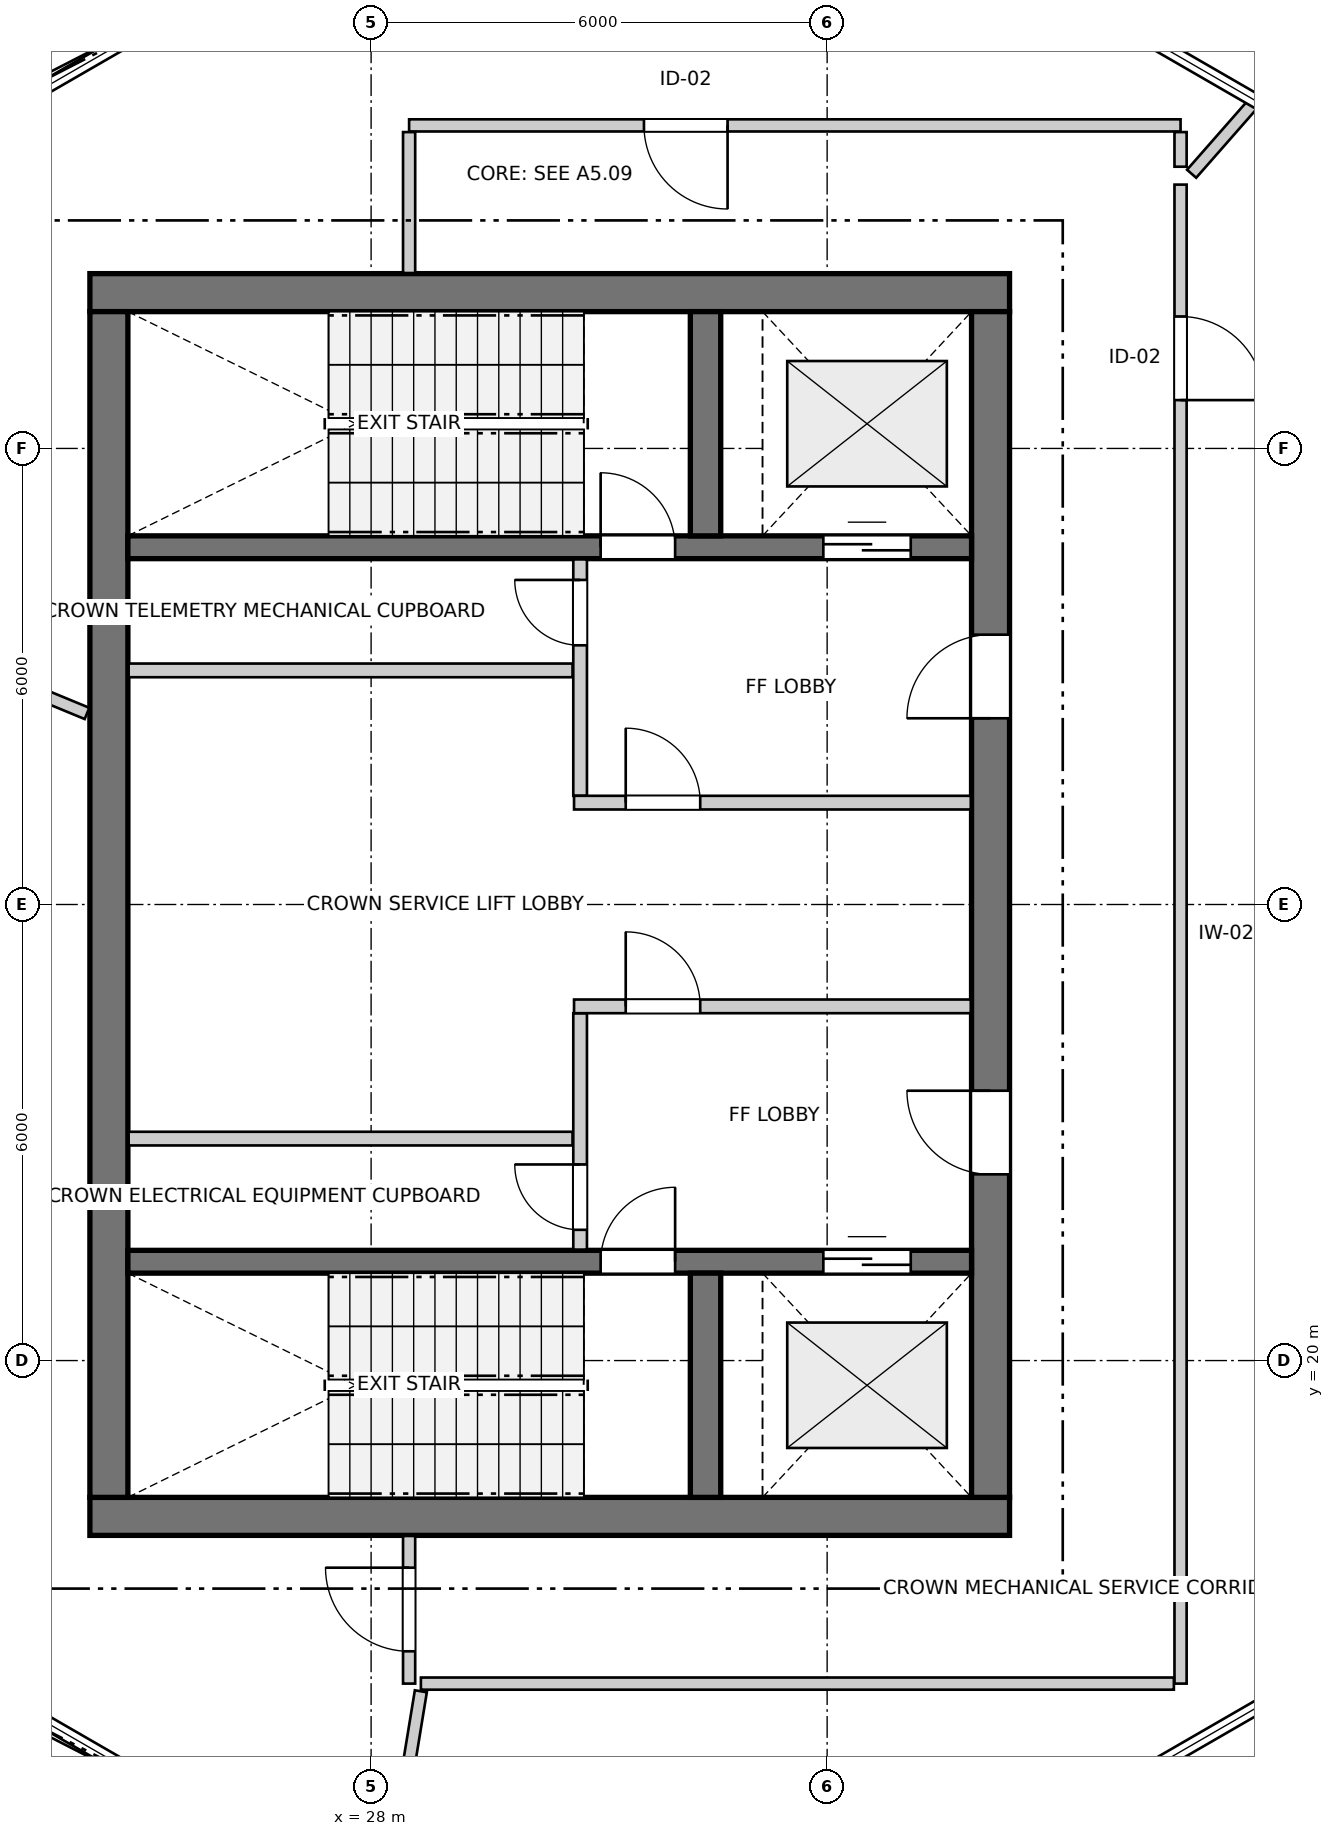
"""IFC4 building model, lengths in metres.
Left out: names, types, materials, properties, quantities, classifications, styles, units other than length and angle.
Written with IfcOpenShell. Run it as: python <this file> out.ifc"""

import sys

from ifc_helpers import new_model, si_unit, direction, frame, frame_2d, origin, place, context, subcontext, project, spatial, rectangle, extrude, source, transform, mapped, element, fill, save


model = new_model("IFC4")
c1 = context("Model", 3, precision=1e-05, world=origin(), true_north=direction((0.0, 1.0)))
c2 = subcontext(c1, "Body", "Model", "MODEL_VIEW")
j1 = project(units=[si_unit("LENGTHUNIT", "METRE"), si_unit("PLANEANGLEUNIT", "RADIAN")], contexts=[c1])
p1 = place(None, origin())
s1 = spatial("IfcSite", under=j1, at=p1, CompositionType="ELEMENT")
p2 = place(p1, origin())
s2 = spatial("IfcBuilding", under=s1, at=p2, CompositionType="ELEMENT")
p3 = place(p2, frame((0.0, 0.0, 261.8)))
s3 = spatial("IfcBuildingStorey", under=s2, at=p3, CompositionType="ELEMENT", Elevation=261.8)
for number, where, z_axis, x_axis in (
    (1, (24.3, 17.95, 0.0), (0.0, 0.0, 1.0), (1.0, 0.0, 0.0)),
    (2, (36.4, 34.05, 0.0), (0.0, 0.0, 1.0), (-1.0, 0.0, 0.0)),
):
    element("IfcWall", number, at=place(p3, frame(where, z_axis=z_axis, x_axis=x_axis)), inside=s3, PredefinedType="SHEAR", context=c2, shape_type="SweptSolid", body=[
        extrude(rectangle(XDim=12.1, YDim=0.5, at=frame_2d((6.05, 0.0))), origin(), (0.0, 0.0, 1.0), 4.05),
    ])
p4 = place(p3, frame((24.55, 33.8, 0.0), z_axis=(0.0, 0.0, 1.0), x_axis=(0.0, -1.0, 0.0)))
e3 = element("IfcWall", 3, at=p4, inside=s3, PredefinedType="SHEAR", context=c2, shape_type="SweptSolid", body=[
    extrude(rectangle(XDim=15.6, YDim=0.5, at=frame_2d((7.8, 0.0))), origin(), (0.0, 0.0, 1.0), 4.05),
])
p5 = place(p3, frame((36.15, 18.2, 0.0), z_axis=(0.0, 0.0, 1.0), x_axis=(0.0, 1.0, 0.0)))
e4 = element("IfcWall", 4, at=p5, inside=s3, PredefinedType="SHEAR", context=c2, shape_type="SweptSolid", body=[
    extrude(rectangle(XDim=15.6, YDim=0.5, at=frame_2d((7.8, 0.0))), origin(), (0.0, 0.0, 1.0), 4.05),
])
p6 = place(p5, frame((4.25, 0.0, 0.0)))
e5 = element("IfcOpeningElement", 5, at=p6, cuts=e4, PredefinedType="OPENING", context=c2, shape_type="SweptSolid", body=[
    extrude(rectangle(XDim=1.1, YDim=2.15, at=frame_2d((0.55, 1.075))), frame((0.0, 0.26, 0.0), z_axis=(0.0, -1.0, 0.0), x_axis=(1.0, 0.0, 0.0)), (0.0, 0.0, 1.0), 0.52),
])
p7 = place(p5, frame((10.25, 0.0, 0.0)))
e6 = element("IfcOpeningElement", 6, at=p7, cuts=e4, PredefinedType="OPENING", context=c2, shape_type="SweptSolid", body=[
    extrude(rectangle(XDim=1.1, YDim=2.15, at=frame_2d((0.55, 1.075))), frame((0.0, 0.26, 0.0), z_axis=(0.0, -1.0, 0.0), x_axis=(1.0, 0.0, 0.0)), (0.0, 0.0, 1.0), 0.52),
])
p8 = place(p3, frame((24.8, 21.3, 0.0), z_axis=(0.0, 0.0, 1.0), x_axis=(1.0, 0.0, 0.0)))
e7 = element("IfcWall", 7, at=p8, inside=s3, PredefinedType="SHEAR", context=c2, shape_type="SweptSolid", body=[
    extrude(rectangle(XDim=11.1, YDim=0.3, at=frame_2d((5.55, 0.0))), origin(), (0.0, 0.0, 1.0), 4.05),
])
p9 = place(p8, frame((6.22, 0.0, 0.0)))
e8 = element("IfcOpeningElement", 8, at=p9, cuts=e7, PredefinedType="OPENING", context=c2, shape_type="SweptSolid", body=[
    extrude(rectangle(XDim=0.98, YDim=2.15, at=frame_2d((0.49, 1.075))), frame((0.0, 0.16, 0.0), z_axis=(0.0, -1.0, 0.0), x_axis=(1.0, 0.0, 0.0)), (0.0, 0.0, 1.0), 0.32),
])
p10 = place(p8, frame((9.15, 0.0, 0.0)))
e9 = element("IfcOpeningElement", 9, at=p10, cuts=e7, PredefinedType="OPENING", context=c2, shape_type="SweptSolid", body=[
    extrude(rectangle(XDim=1.15, YDim=2.15, at=frame_2d((0.575, 1.075))), frame((0.0, 0.16, 0.0), z_axis=(0.0, -1.0, 0.0), x_axis=(1.0, 0.0, 0.0)), (0.0, 0.0, 1.0), 0.32),
])
p11 = place(p3, frame((32.4, 18.2, 0.0), z_axis=(0.0, 0.0, 1.0), x_axis=(0.0, 1.0, 0.0)))
e10 = element("IfcWall", 10, at=p11, inside=s3, PredefinedType="SHEAR", context=c2, shape_type="SweptSolid", body=[
    extrude(rectangle(XDim=2.95, YDim=0.4, at=frame_2d((1.475, 0.0))), origin(), (0.0, 0.0, 1.0), 4.05),
])
p12 = place(p3, frame((24.8, 30.7, 0.0), z_axis=(0.0, 0.0, 1.0), x_axis=(1.0, 0.0, 0.0)))
e11 = element("IfcWall", 11, at=p12, inside=s3, PredefinedType="SHEAR", context=c2, shape_type="SweptSolid", body=[
    extrude(rectangle(XDim=11.1, YDim=0.3, at=frame_2d((5.55, 0.0))), origin(), (0.0, 0.0, 1.0), 4.05),
])
p13 = place(p12, frame((6.22, 0.0, 0.0)))
e12 = element("IfcOpeningElement", 12, at=p13, cuts=e11, PredefinedType="OPENING", context=c2, shape_type="SweptSolid", body=[
    extrude(rectangle(XDim=0.98, YDim=2.15, at=frame_2d((0.49, 1.075))), frame((0.0, 0.16, 0.0), z_axis=(0.0, -1.0, 0.0), x_axis=(1.0, 0.0, 0.0)), (0.0, 0.0, 1.0), 0.32),
])
p14 = place(p12, frame((9.15, 0.0, 0.0)))
e13 = element("IfcOpeningElement", 13, at=p14, cuts=e11, PredefinedType="OPENING", context=c2, shape_type="SweptSolid", body=[
    extrude(rectangle(XDim=1.15, YDim=2.15, at=frame_2d((0.575, 1.075))), frame((0.0, 0.16, 0.0), z_axis=(0.0, -1.0, 0.0), x_axis=(1.0, 0.0, 0.0)), (0.0, 0.0, 1.0), 0.32),
])
p15 = place(p3, frame((32.4, 30.85, 0.0), z_axis=(0.0, 0.0, 1.0), x_axis=(0.0, 1.0, 0.0)))
e14 = element("IfcWall", 14, at=p15, inside=s3, PredefinedType="SHEAR", context=c2, shape_type="SweptSolid", body=[
    extrude(rectangle(XDim=2.95, YDim=0.4, at=frame_2d((1.475, 0.0))), origin(), (0.0, 0.0, 1.0), 4.05),
])
p16 = place(p3, frame((30.75, 21.46, 0.0), z_axis=(0.0, 0.0, 1.0), x_axis=(0.0, 1.0, 0.0)))
e15 = element("IfcWall", 15, at=p16, inside=s3, PredefinedType="PARTITIONING", context=c2, shape_type="SweptSolid", body=[
    extrude(rectangle(XDim=3.11, YDim=0.18, at=frame_2d((1.555, 0.0))), origin(), (0.0, 0.0, 1.0), 4.05),
])
p17 = place(p16, frame((0.26, 0.0, 0.0)))
e16 = element("IfcOpeningElement", 16, at=p17, cuts=e15, PredefinedType="OPENING", context=c2, shape_type="SweptSolid", body=[
    extrude(rectangle(XDim=0.86, YDim=2.05, at=frame_2d((0.43, 1.025))), frame((0.0, 0.1, 0.0), z_axis=(0.0, -1.0, 0.0), x_axis=(1.0, 0.0, 0.0)), (0.0, 0.0, 1.0), 0.2),
])
p18 = place(p3, frame((30.67, 24.66, 0.0), z_axis=(0.0, 0.0, 1.0), x_axis=(1.0, 0.0, 0.0)))
e17 = element("IfcWall", 17, at=p18, inside=s3, PredefinedType="PARTITIONING", context=c2, shape_type="SweptSolid", body=[
    extrude(rectangle(XDim=5.22, YDim=0.18, at=frame_2d((2.61, 0.0))), origin(), (0.0, 0.0, 1.0), 4.05),
])
p19 = place(p18, frame((0.68, 0.0, 0.0)))
e18 = element("IfcOpeningElement", 18, at=p19, cuts=e17, PredefinedType="OPENING", context=c2, shape_type="SweptSolid", body=[
    extrude(rectangle(XDim=0.98, YDim=2.15, at=frame_2d((0.49, 1.075))), frame((0.0, 0.1, 0.0), z_axis=(0.0, -1.0, 0.0), x_axis=(1.0, 0.0, 0.0)), (0.0, 0.0, 1.0), 0.2),
])
p20 = place(p3, frame((30.75, 27.43, 0.0), z_axis=(0.0, 0.0, 1.0), x_axis=(0.0, 1.0, 0.0)))
e19 = element("IfcWall", 19, at=p20, inside=s3, PredefinedType="PARTITIONING", context=c2, shape_type="SweptSolid", body=[
    extrude(rectangle(XDim=3.11, YDim=0.18, at=frame_2d((1.555, 0.0))), origin(), (0.0, 0.0, 1.0), 4.05),
])
p21 = place(p20, frame((1.98, 0.0, 0.0)))
e20 = element("IfcOpeningElement", 20, at=p21, cuts=e19, PredefinedType="OPENING", context=c2, shape_type="SweptSolid", body=[
    extrude(rectangle(XDim=0.86, YDim=2.05, at=frame_2d((0.43, 1.025))), frame((0.0, 0.1, 0.0), z_axis=(0.0, -1.0, 0.0), x_axis=(1.0, 0.0, 0.0)), (0.0, 0.0, 1.0), 0.2),
])
p22 = place(p3, frame((30.67, 27.34, 0.0), z_axis=(0.0, 0.0, 1.0), x_axis=(1.0, 0.0, 0.0)))
e21 = element("IfcWall", 21, at=p22, inside=s3, PredefinedType="PARTITIONING", context=c2, shape_type="SweptSolid", body=[
    extrude(rectangle(XDim=5.22, YDim=0.18, at=frame_2d((2.61, 0.0))), origin(), (0.0, 0.0, 1.0), 4.05),
])
p23 = place(p22, frame((0.68, 0.0, 0.0)))
e22 = element("IfcOpeningElement", 22, at=p23, cuts=e21, PredefinedType="OPENING", context=c2, shape_type="SweptSolid", body=[
    extrude(rectangle(XDim=0.98, YDim=2.15, at=frame_2d((0.49, 1.075))), frame((0.0, 0.1, 0.0), z_axis=(0.0, -1.0, 0.0), x_axis=(1.0, 0.0, 0.0)), (0.0, 0.0, 1.0), 0.2),
])
for number, where, z_axis, x_axis in (
    (23, (24.81, 22.92, 0.0), (0.0, 0.0, 1.0), (1.0, 0.0, 0.0)),
    (24, (24.81, 29.08, 0.0), (0.0, 0.0, 1.0), (1.0, 0.0, 0.0)),
):
    element("IfcWall", number, at=place(p3, frame(where, z_axis=z_axis, x_axis=x_axis)), inside=s3, PredefinedType="PARTITIONING", context=c2, shape_type="SweptSolid", body=[
        extrude(rectangle(XDim=5.84, YDim=0.18, at=frame_2d((2.92, 0.0))), origin(), (0.0, 0.0, 1.0), 4.05),
    ])
p24 = place(p3, frame((38.65, 35.471, 0.0), z_axis=(0.0, 0.0, 1.0), x_axis=(0.0, -1.0, 0.0)))
e25 = element("IfcWall", 25, at=p24, inside=s3, PredefinedType="PARTITIONING", context=c2, shape_type="SweptSolid", body=[
    extrude(rectangle(XDim=19.721, YDim=0.16, at=frame_2d((9.86, 0.0))), origin(), (0.0, 0.0, 1.0), 4.05),
])
p25 = place(p24, frame((1.735, 0.0, 0.0)))
e26 = element("IfcOpeningElement", 26, at=p25, cuts=e25, PredefinedType="OPENING", context=c2, shape_type="SweptSolid", body=[
    extrude(rectangle(XDim=1.1, YDim=2.15, at=frame_2d((0.55, 1.075))), frame((0.0, 0.09, 0.0), z_axis=(0.0, -1.0, 0.0), x_axis=(1.0, 0.0, 0.0)), (0.0, 0.0, 1.0), 0.18),
])
p26 = place(p3, frame((38.65, 36.25, 0.0), z_axis=(0.0, 0.0, 1.0), x_axis=(-1.0, 0.0, 0.0)))
e27 = element("IfcWall", 27, at=p26, inside=s3, PredefinedType="PARTITIONING", context=c2, shape_type="SweptSolid", body=[
    extrude(rectangle(XDim=10.15, YDim=0.16, at=frame_2d((5.075, 0.0))), origin(), (0.0, 0.0, 1.0), 4.05),
])
p27 = place(p26, frame((5.96, 0.0, 0.0)))
e28 = element("IfcOpeningElement", 28, at=p27, cuts=e27, PredefinedType="OPENING", context=c2, shape_type="SweptSolid", body=[
    extrude(rectangle(XDim=1.1, YDim=2.15, at=frame_2d((0.55, 1.075))), frame((0.0, 0.09, 0.0), z_axis=(0.0, -1.0, 0.0), x_axis=(1.0, 0.0, 0.0)), (0.0, 0.0, 1.0), 0.18),
])
p28 = place(p3, frame((28.5, 15.75, 0.0), z_axis=(0.0, 0.0, 1.0), x_axis=(0.0, 1.0, 0.0)))
e29 = element("IfcWall", 29, at=p28, inside=s3, PredefinedType="PARTITIONING", context=c2, shape_type="SweptSolid", body=[
    extrude(rectangle(XDim=1.942, YDim=0.16, at=frame_2d((0.971, 0.0))), origin(), (0.0, 0.0, 1.0), 4.05),
])
p29 = place(p28, frame((0.425, 0.0, 0.0)))
e30 = element("IfcOpeningElement", 30, at=p29, cuts=e29, PredefinedType="OPENING", context=c2, shape_type="SweptSolid", body=[
    extrude(rectangle(XDim=1.1, YDim=2.15, at=frame_2d((0.55, 1.075))), frame((0.0, 0.09, 0.0), z_axis=(0.0, -1.0, 0.0), x_axis=(1.0, 0.0, 0.0)), (0.0, 0.0, 1.0), 0.18),
])
p30 = place(p3, frame((28.655, 15.75, 0.0), z_axis=(0.0, 0.0, 1.0), x_axis=(1.0, 0.0, 0.0)))
e31 = element("IfcWall", 31, at=p30, inside=s3, PredefinedType="PARTITIONING", context=c2, shape_type="SweptSolid", body=[
    extrude(rectangle(XDim=9.907, YDim=0.16, at=frame_2d((4.954, 0.0))), origin(), (0.0, 0.0, 1.0), 4.05),
])
p31 = place(p3, frame((16.755, 31.614, 0.0), z_axis=(0.0, 0.0, 1.0), x_axis=(0.924294163269, -0.381680887323, 0.0)))
e32 = element("IfcWall", 32, at=p31, inside=s3, PredefinedType="PARTITIONING", context=c2, shape_type="SweptSolid", body=[
    extrude(rectangle(XDim=8.122, YDim=0.16, at=frame_2d((4.061, 0.0))), origin(), (0.0, 0.0, 1.0), 4.05),
])
p32 = place(p3, frame((28.241, 13.128, 0.0), z_axis=(0.0, 0.0, 1.0), x_axis=(0.161794860742, 0.986824413479, 0.0)))
e33 = element("IfcWall", 33, at=p32, inside=s3, PredefinedType="PARTITIONING", context=c2, shape_type="SweptSolid", body=[
    extrude(rectangle(XDim=2.555, YDim=0.16, at=frame_2d((1.277, 0.0))), origin(), (0.0, 0.0, 1.0), 4.05),
])
p33 = place(p3, frame((28.5, 34.308, 0.0), z_axis=(0.0, 0.0, 1.0), x_axis=(0.0, 1.0, 0.0)))
e34 = element("IfcWall", 34, at=p33, inside=s3, PredefinedType="PARTITIONING", context=c2, shape_type="SweptSolid", body=[
    extrude(rectangle(XDim=1.854, YDim=0.16, at=frame_2d((0.927, 0.0))), origin(), (0.0, 0.0, 1.0), 4.05),
])
p34 = place(p3, frame((38.795, 35.614, 0.0), z_axis=(0.0, 0.0, 1.0), x_axis=(0.65984690388, 0.751400068832, 0.0)))
e35 = element("IfcWall", 35, at=p34, inside=s3, PredefinedType="PARTITIONING", context=c2, shape_type="SweptSolid", body=[
    extrude(rectangle(XDim=1.544, YDim=0.16, at=frame_2d((0.772, 0.0))), origin(), (0.0, 0.0, 1.0), 4.05),
])
p35 = place(p3, frame((38.65, 35.706, 0.0), z_axis=(0.0, 0.0, 1.0), x_axis=(0.0, 1.0, 0.0)))
e36 = element("IfcWall", 36, at=p35, inside=s3, PredefinedType="PARTITIONING", context=c2, shape_type="SweptSolid", body=[
    extrude(rectangle(XDim=0.456, YDim=0.16, at=frame_2d((0.228, 0.0))), origin(), (0.0, 0.0, 1.0), 4.05),
])
m1 = source(origin(), c2, "Body", "SweptSolid", [
    extrude(rectangle(XDim=0.98, YDim=2.15, at=frame_2d((0.49, 1.075))), frame((0.0, 0.025, 0.0), z_axis=(0.0, -1.0, 0.0), x_axis=(1.0, 0.0, 0.0)), (0.0, 0.0, 1.0), 0.05),
])
p36 = place(p9, origin())
e37 = element("IfcDoor", 37, at=p36, inside=s3, OperationType="SINGLE_SWING_RIGHT", PredefinedType="DOOR", context=c2, shape_type="MappedRepresentation", body=[
    mapped(m1, transform((0.0, 0.0, 0.0), x_axis=(1.0, 0.0, 0.0), y_axis=(0.0, 1.0, 0.0), z_axis=(0.0, 0.0, 1.0), scale=1.0)),
])
fill(e8, e37)
m2 = source(origin(), c2, "Body", "SweptSolid", [
    extrude(rectangle(XDim=1.15, YDim=2.15, at=frame_2d((0.575, 1.075))), frame((0.0, 0.025, 0.0), z_axis=(0.0, -1.0, 0.0), x_axis=(1.0, 0.0, 0.0)), (0.0, 0.0, 1.0), 0.05),
])
p37 = place(p10, origin())
e38 = element("IfcDoor", 38, at=p37, inside=s3, OperationType="DOUBLE_DOOR_SLIDING", PredefinedType="DOOR", context=c2, shape_type="MappedRepresentation", body=[
    mapped(m2, transform((0.0, 0.0, 0.0), x_axis=(1.0, 0.0, 0.0), y_axis=(0.0, 1.0, 0.0), z_axis=(0.0, 0.0, 1.0), scale=1.0)),
])
fill(e9, e38)
p38 = place(p13, origin())
e39 = element("IfcDoor", 39, at=p38, inside=s3, OperationType="SINGLE_SWING_LEFT", PredefinedType="DOOR", context=c2, shape_type="MappedRepresentation", body=[
    mapped(m1, transform((0.0, 0.0, 0.0), x_axis=(1.0, 0.0, 0.0), y_axis=(0.0, 1.0, 0.0), z_axis=(0.0, 0.0, 1.0), scale=1.0)),
])
fill(e12, e39)
p39 = place(p14, origin())
e40 = element("IfcDoor", 40, at=p39, inside=s3, OperationType="DOUBLE_DOOR_SLIDING", PredefinedType="DOOR", context=c2, shape_type="MappedRepresentation", body=[
    mapped(m2, transform((0.0, 0.0, 0.0), x_axis=(1.0, 0.0, 0.0), y_axis=(0.0, 1.0, 0.0), z_axis=(0.0, 0.0, 1.0), scale=1.0)),
])
fill(e13, e40)
m3 = source(origin(), c2, "Body", "SweptSolid", [
    extrude(rectangle(XDim=1.1, YDim=2.15, at=frame_2d((0.55, 1.075))), frame((0.0, 0.025, 0.0), z_axis=(0.0, -1.0, 0.0), x_axis=(1.0, 0.0, 0.0)), (0.0, 0.0, 1.0), 0.05),
])
p40 = place(p6, origin())
e41 = element("IfcDoor", 41, at=p40, inside=s3, OperationType="SINGLE_SWING_RIGHT", PredefinedType="DOOR", context=c2, shape_type="MappedRepresentation", body=[
    mapped(m3, transform((0.0, 0.0, 0.0), x_axis=(1.0, 0.0, 0.0), y_axis=(0.0, 1.0, 0.0), z_axis=(0.0, 0.0, 1.0), scale=1.0)),
])
fill(e5, e41)
p41 = place(p7, origin())
e42 = element("IfcDoor", 42, at=p41, inside=s3, OperationType="SINGLE_SWING_LEFT", PredefinedType="DOOR", context=c2, shape_type="MappedRepresentation", body=[
    mapped(m3, transform((0.0, 0.0, 0.0), x_axis=(1.0, 0.0, 0.0), y_axis=(0.0, 1.0, 0.0), z_axis=(0.0, 0.0, 1.0), scale=1.0)),
])
fill(e6, e42)
m4 = source(origin(), c2, "Body", "SweptSolid", [
    extrude(rectangle(XDim=0.86, YDim=2.05, at=frame_2d((0.43, 1.025))), frame((0.0, 0.025, 0.0), z_axis=(0.0, -1.0, 0.0), x_axis=(1.0, 0.0, 0.0)), (0.0, 0.0, 1.0), 0.05),
])
p42 = place(p17, origin())
e43 = element("IfcDoor", 43, at=p42, inside=s3, OperationType="SINGLE_SWING_RIGHT", PredefinedType="DOOR", context=c2, shape_type="MappedRepresentation", body=[
    mapped(m4, transform((0.0, 0.0, 0.0), x_axis=(1.0, 0.0, 0.0), y_axis=(0.0, 1.0, 0.0), z_axis=(0.0, 0.0, 1.0), scale=1.0)),
])
fill(e16, e43)
p43 = place(p19, origin())
e44 = element("IfcDoor", 44, at=p43, inside=s3, OperationType="SINGLE_SWING_LEFT", PredefinedType="DOOR", context=c2, shape_type="MappedRepresentation", body=[
    mapped(m1, transform((0.0, 0.0, 0.0), x_axis=(1.0, 0.0, 0.0), y_axis=(0.0, 1.0, 0.0), z_axis=(0.0, 0.0, 1.0), scale=1.0)),
])
fill(e18, e44)
p44 = place(p21, origin())
e45 = element("IfcDoor", 45, at=p44, inside=s3, OperationType="SINGLE_SWING_RIGHT", PredefinedType="DOOR", context=c2, shape_type="MappedRepresentation", body=[
    mapped(m4, transform((0.0, 0.0, 0.0), x_axis=(1.0, 0.0, 0.0), y_axis=(0.0, 1.0, 0.0), z_axis=(0.0, 0.0, 1.0), scale=1.0)),
])
fill(e20, e45)
p45 = place(p23, origin())
e46 = element("IfcDoor", 46, at=p45, inside=s3, OperationType="SINGLE_SWING_LEFT", PredefinedType="DOOR", context=c2, shape_type="MappedRepresentation", body=[
    mapped(m1, transform((0.0, 0.0, 0.0), x_axis=(1.0, 0.0, 0.0), y_axis=(0.0, 1.0, 0.0), z_axis=(0.0, 0.0, 1.0), scale=1.0)),
])
fill(e22, e46)
p46 = place(p25, origin())
e47 = element("IfcDoor", 47, at=p46, inside=s3, OperationType="SINGLE_SWING_RIGHT", PredefinedType="DOOR", context=c2, shape_type="MappedRepresentation", body=[
    mapped(m3, transform((0.0, 0.0, 0.0), x_axis=(1.0, 0.0, 0.0), y_axis=(0.0, 1.0, 0.0), z_axis=(0.0, 0.0, 1.0), scale=1.0)),
])
fill(e26, e47)
p47 = place(p27, origin())
e48 = element("IfcDoor", 48, at=p47, inside=s3, OperationType="SINGLE_SWING_LEFT", PredefinedType="DOOR", context=c2, shape_type="MappedRepresentation", body=[
    mapped(m3, transform((0.0, 0.0, 0.0), x_axis=(1.0, 0.0, 0.0), y_axis=(0.0, 1.0, 0.0), z_axis=(0.0, 0.0, 1.0), scale=1.0)),
])
fill(e28, e48)
p48 = place(p29, origin())
e49 = element("IfcDoor", 49, at=p48, inside=s3, OperationType="SINGLE_SWING_RIGHT", PredefinedType="DOOR", context=c2, shape_type="MappedRepresentation", body=[
    mapped(m3, transform((0.0, 0.0, 0.0), x_axis=(1.0, 0.0, 0.0), y_axis=(0.0, 1.0, 0.0), z_axis=(0.0, 0.0, 1.0), scale=1.0)),
])
fill(e30, e49)
save(model, sys.argv[1])
